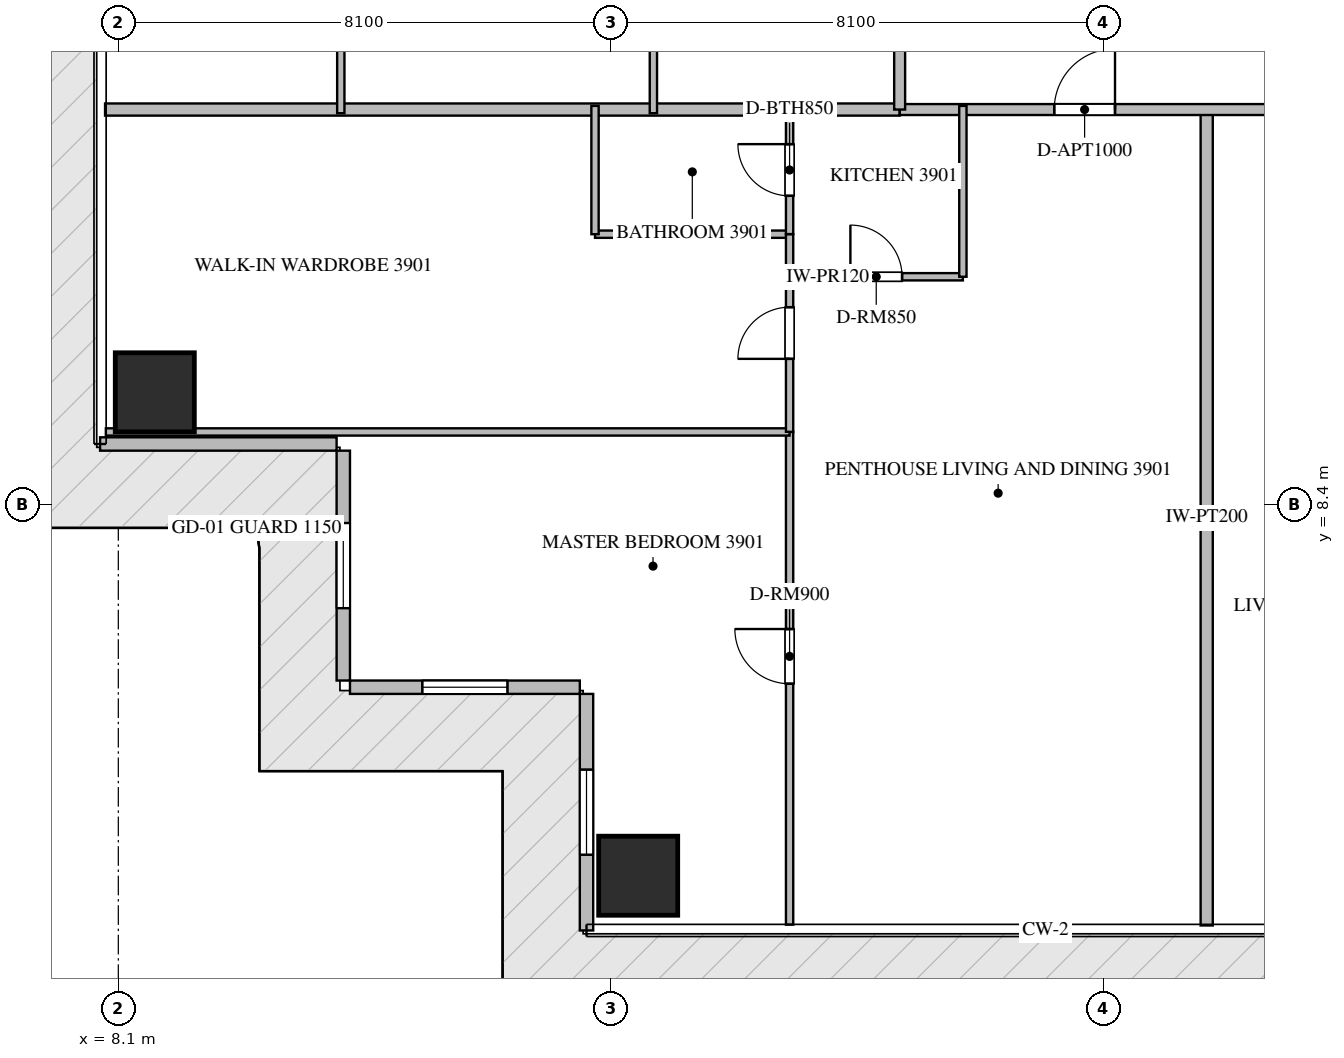
"""IFC4 building model, lengths in metres.
Left out: names, types, materials, properties, quantities, classifications, styles, units other than length and angle.
Written with IfcOpenShell. Run it as: python <this file> out.ifc"""

import sys

from ifc_helpers import new_model, si_unit, direction, frame, frame_2d, origin, origin_2d, place, context, subcontext, project, spatial, rectangle, extrude, source, transform, mapped, element, fill, save


model = new_model("IFC4")
c1 = context("Model", 3, precision=1e-05, world=origin(), true_north=direction((0.0, 1.0)))
c2 = subcontext(c1, "Body", "Model", "MODEL_VIEW")
j1 = project(units=[si_unit("LENGTHUNIT", "METRE"), si_unit("PLANEANGLEUNIT", "RADIAN")], contexts=[c1])
p1 = place(None, origin())
s1 = spatial("IfcSite", under=j1, at=p1, CompositionType="ELEMENT")
p2 = place(p1, origin())
s2 = spatial("IfcBuilding", under=s1, at=p2, CompositionType="ELEMENT")
p3 = place(p2, frame((0.0, 0.0, 157.65)))
s3 = spatial("IfcBuildingStorey", under=s2, at=p3, CompositionType="ELEMENT", Elevation=157.65)
m1 = source(origin(), c2, "Body", "SweptSolid", [
    extrude(rectangle(XDim=1.3, YDim=1.3, at=origin_2d()), origin(), (0.0, 0.0, 1.0), 3.75),
])
for number, where, z_axis, x_axis in (
    (1, (16.65, 2.3, -0.26), (0.0, 0.0, 1.0), (1.0, 0.0, 0.0)),
    (2, (8.7, 10.25, -0.26), (0.0, 0.0, 1.0), (1.0, 0.0, 0.0)),
):
    element("IfcColumn", number, at=place(p3, frame(where, z_axis=z_axis, x_axis=x_axis)), inside=s3, PredefinedType="COLUMN", context=c2, shape_type="MappedRepresentation", body=[
        mapped(m1, transform((0.0, 0.0, 0.0), scale=1.0)),
    ])
p4 = place(p3, frame((7.8, 9.4, 0.0), z_axis=(0.0, 0.0, 1.0), x_axis=(1.0, 0.0, 0.0)))
e3 = element("IfcWall", 3, at=p4, inside=s3, PredefinedType="ELEMENTEDWALL", context=c2, shape_type="SweptSolid", body=[
    extrude(rectangle(XDim=3.89, YDim=0.22, at=frame_2d((1.945, 0.0))), origin(), (0.0, 0.0, 1.0), 3.475),
])
p5 = place(p3, frame((11.8, 9.29, 0.0), z_axis=(0.0, 0.0, 1.0), x_axis=(0.0, -1.0, 0.0)))
e4 = element("IfcWall", 4, at=p5, inside=s3, PredefinedType="ELEMENTEDWALL", context=c2, shape_type="SweptSolid", body=[
    extrude(rectangle(XDim=3.78, YDim=0.22, at=frame_2d((1.89, 0.0))), origin(), (0.0, 0.0, 1.0), 3.475),
])
p6 = place(p5, frame((1.19, 0.0, 0.65)))
e5 = element("IfcOpeningElement", 5, at=p6, cuts=e4, PredefinedType="OPENING", context=c2, shape_type="SweptSolid", body=[
    extrude(rectangle(XDim=1.4, YDim=2.05, at=frame_2d((0.7, 1.025))), frame((0.0, 0.12, 0.0), z_axis=(0.0, -1.0, 0.0), x_axis=(1.0, 0.0, 0.0)), (0.0, 0.0, 1.0), 0.24),
])
p7 = place(p3, frame((11.91, 5.4, 0.0), z_axis=(0.0, 0.0, 1.0), x_axis=(1.0, 0.0, 0.0)))
e6 = element("IfcWall", 6, at=p7, inside=s3, PredefinedType="ELEMENTEDWALL", context=c2, shape_type="SweptSolid", body=[
    extrude(rectangle(XDim=3.78, YDim=0.22, at=frame_2d((1.89, 0.0))), origin(), (0.0, 0.0, 1.0), 3.475),
])
p8 = place(p7, frame((1.19, 0.0, 0.65)))
e7 = element("IfcOpeningElement", 7, at=p8, cuts=e6, PredefinedType="OPENING", context=c2, shape_type="SweptSolid", body=[
    extrude(rectangle(XDim=1.4, YDim=2.05, at=frame_2d((0.7, 1.025))), frame((0.0, 0.12, 0.0), z_axis=(0.0, -1.0, 0.0), x_axis=(1.0, 0.0, 0.0)), (0.0, 0.0, 1.0), 0.24),
])
p9 = place(p3, frame((15.8, 5.29, 0.0), z_axis=(0.0, 0.0, 1.0), x_axis=(0.0, -1.0, 0.0)))
e8 = element("IfcWall", 8, at=p9, inside=s3, PredefinedType="ELEMENTEDWALL", context=c2, shape_type="SweptSolid", body=[
    extrude(rectangle(XDim=3.89, YDim=0.22, at=frame_2d((1.945, 0.0))), origin(), (0.0, 0.0, 1.0), 3.475),
])
p10 = place(p9, frame((1.245, 0.0, 0.65)))
e9 = element("IfcOpeningElement", 9, at=p10, cuts=e8, PredefinedType="OPENING", context=c2, shape_type="SweptSolid", body=[
    extrude(rectangle(XDim=1.4, YDim=2.05, at=frame_2d((0.7, 1.025))), frame((0.0, 0.12, 0.0), z_axis=(0.0, -1.0, 0.0), x_axis=(1.0, 0.0, 0.0)), (0.0, 0.0, 1.0), 0.24),
])
p11 = place(p3, frame((26.0, 1.482, 0.0), z_axis=(0.0, 0.0, 1.0), x_axis=(0.0, 1.0, 0.0)))
e10 = element("IfcWall", 10, at=p11, inside=s3, PredefinedType="PARTITIONING", context=c2, shape_type="SweptSolid", body=[
    extrude(rectangle(XDim=13.418, YDim=0.2, at=frame_2d((6.709, 0.0))), origin(), (0.0, 0.0, 1.0), 3.49),
])
p12 = place(p3, frame((7.882, 14.9, 0.0), z_axis=(0.0, 0.0, 1.0), x_axis=(1.0, 0.0, 0.0)))
e11 = element("IfcWall", 11, at=p12, inside=s3, PredefinedType="PARTITIONING", context=c2, shape_type="SweptSolid", body=[
    extrude(rectangle(XDim=13.068, YDim=0.2, at=frame_2d((6.534, 0.0))), origin(), (0.0, 0.0, 1.0), 3.49),
])
p13 = place(p3, frame((20.952, 14.9, 0.0), z_axis=(0.0, 0.0, 1.0), x_axis=(1.0, 0.0, 0.0)))
e12 = element("IfcWall", 12, at=p13, inside=s3, PredefinedType="PARTITIONING", context=c2, shape_type="SweptSolid", body=[
    extrude(rectangle(XDim=22.896, YDim=0.18, at=frame_2d((11.448, 0.0))), origin(), (0.0, 0.0, 1.0), 3.49),
])
p14 = place(p13, frame((2.54, 0.0, 0.0)))
e13 = element("IfcOpeningElement", 13, at=p14, cuts=e12, PredefinedType="OPENING", context=c2, shape_type="SweptSolid", body=[
    extrude(rectangle(XDim=1.0, YDim=2.15, at=frame_2d((0.5, 1.075))), frame((0.0, 0.1, 0.0), z_axis=(0.0, -1.0, 0.0), x_axis=(1.0, 0.0, 0.0)), (0.0, 0.0, 1.0), 0.2),
])
p15 = place(p13, frame((6.985, 0.0, 0.0)))
e14 = element("IfcOpeningElement", 14, at=p15, cuts=e12, PredefinedType="OPENING", context=c2, shape_type="SweptSolid", body=[
    extrude(rectangle(XDim=1.0, YDim=2.15, at=frame_2d((0.5, 1.075))), frame((0.0, 0.1, 0.0), z_axis=(0.0, -1.0, 0.0), x_axis=(1.0, 0.0, 0.0)), (0.0, 0.0, 1.0), 0.2),
])
p16 = place(p13, frame((19.356, 0.0, 0.0)))
e15 = element("IfcOpeningElement", 15, at=p16, cuts=e12, PredefinedType="OPENING", context=c2, shape_type="SweptSolid", body=[
    extrude(rectangle(XDim=1.0, YDim=2.15, at=frame_2d((0.5, 1.075))), frame((0.0, 0.1, 0.0), z_axis=(0.0, -1.0, 0.0), x_axis=(1.0, 0.0, 0.0)), (0.0, 0.0, 1.0), 0.2),
])
p17 = place(p3, frame((20.95, 14.9, 0.0), z_axis=(0.0, 0.0, 1.0), x_axis=(0.0, 1.0, 0.0)))
e16 = element("IfcWall", 16, at=p17, inside=s3, PredefinedType="PARTITIONING", context=c2, shape_type="SweptSolid", body=[
    extrude(rectangle(XDim=18.7, YDim=0.18, at=frame_2d((9.35, 0.0))), origin(), (0.0, 0.0, 1.0), 3.49),
])
p18 = place(p17, frame((14.603, 0.0, 0.0)))
e17 = element("IfcOpeningElement", 17, at=p18, cuts=e16, PredefinedType="OPENING", context=c2, shape_type="SweptSolid", body=[
    extrude(rectangle(XDim=1.0, YDim=2.15, at=frame_2d((0.5, 1.075))), frame((0.0, 0.1, 0.0), z_axis=(0.0, -1.0, 0.0), x_axis=(1.0, 0.0, 0.0)), (0.0, 0.0, 1.0), 0.2),
])
p19 = place(p3, frame((19.14, 12.15, 0.0), z_axis=(0.0, 0.0, 1.0), x_axis=(1.0, 0.0, 0.0)))
e18 = element("IfcWall", 18, at=p19, inside=s3, PredefinedType="PARTITIONING", context=c2, shape_type="SweptSolid", body=[
    extrude(rectangle(XDim=2.85, YDim=0.12, at=frame_2d((1.425, 0.0))), origin(), (0.0, 0.0, 1.0), 3.49),
])
p20 = place(p19, frame((1.0, 0.0, 0.0)))
e19 = element("IfcOpeningElement", 19, at=p20, cuts=e18, PredefinedType="OPENING", context=c2, shape_type="SweptSolid", body=[
    extrude(rectangle(XDim=0.85, YDim=2.1, at=frame_2d((0.425, 1.05))), frame((0.0, 0.07, 0.0), z_axis=(0.0, -1.0, 0.0), x_axis=(1.0, 0.0, 0.0)), (0.0, 0.0, 1.0), 0.14),
])
p21 = place(p3, frame((21.99, 12.15, 0.0), z_axis=(0.0, 0.0, 1.0), x_axis=(0.0, 1.0, 0.0)))
e20 = element("IfcWall", 20, at=p21, inside=s3, PredefinedType="PARTITIONING", context=c2, shape_type="SweptSolid", body=[
    extrude(rectangle(XDim=2.81, YDim=0.12, at=frame_2d((1.405, 0.0))), origin(), (0.0, 0.0, 1.0), 3.49),
])
p22 = place(p3, frame((19.14, 1.495, 0.0), z_axis=(0.0, 0.0, 1.0), x_axis=(0.0, 1.0, 0.0)))
e21 = element("IfcWall", 21, at=p22, inside=s3, PredefinedType="PARTITIONING", context=c2, shape_type="SweptSolid", body=[
    extrude(rectangle(XDim=8.103, YDim=0.12, at=frame_2d((4.051, 0.0))), origin(), (0.0, 0.0, 1.0), 3.49),
])
p23 = place(p22, frame((3.962, 0.0, 0.0)))
e22 = element("IfcOpeningElement", 22, at=p23, cuts=e21, PredefinedType="OPENING", context=c2, shape_type="SweptSolid", body=[
    extrude(rectangle(XDim=0.9, YDim=2.1, at=frame_2d((0.45, 1.05))), frame((0.0, 0.07, 0.0), z_axis=(0.0, -1.0, 0.0), x_axis=(1.0, 0.0, 0.0)), (0.0, 0.0, 1.0), 0.14),
])
p24 = place(p3, frame((7.895, 9.598, 0.0), z_axis=(0.0, 0.0, 1.0), x_axis=(1.0, 0.0, 0.0)))
e23 = element("IfcWall", 23, at=p24, inside=s3, PredefinedType="PARTITIONING", context=c2, shape_type="SweptSolid", body=[
    extrude(rectangle(XDim=11.245, YDim=0.12, at=frame_2d((5.623, 0.0))), origin(), (0.0, 0.0, 1.0), 3.49),
])
p25 = place(p3, frame((15.94, 12.85, 0.0), z_axis=(0.0, 0.0, 1.0), x_axis=(1.0, 0.0, 0.0)))
e24 = element("IfcWall", 24, at=p25, inside=s3, PredefinedType="PARTITIONING", context=c2, shape_type="SweptSolid", body=[
    extrude(rectangle(XDim=3.2, YDim=0.12, at=frame_2d((1.6, 0.0))), origin(), (0.0, 0.0, 1.0), 3.49),
])
p26 = place(p3, frame((15.94, 12.85, 0.0), z_axis=(0.0, 0.0, 1.0), x_axis=(0.0, 1.0, 0.0)))
e25 = element("IfcWall", 25, at=p26, inside=s3, PredefinedType="PARTITIONING", context=c2, shape_type="SweptSolid", body=[
    extrude(rectangle(XDim=2.11, YDim=0.12, at=frame_2d((1.055, 0.0))), origin(), (0.0, 0.0, 1.0), 3.49),
])
p27 = place(p3, frame((19.14, 9.6, 0.0), z_axis=(0.0, 0.0, 1.0), x_axis=(0.0, 1.0, 0.0)))
e26 = element("IfcWall", 26, at=p27, inside=s3, PredefinedType="PARTITIONING", context=c2, shape_type="SweptSolid", body=[
    extrude(rectangle(XDim=3.25, YDim=0.12, at=frame_2d((1.625, 0.0))), origin(), (0.0, 0.0, 1.0), 3.49),
])
p28 = place(p27, frame((1.2, 0.0, 0.0)))
e27 = element("IfcOpeningElement", 27, at=p28, cuts=e26, PredefinedType="OPENING", context=c2, shape_type="SweptSolid", body=[
    extrude(rectangle(XDim=0.85, YDim=2.1, at=frame_2d((0.425, 1.05))), frame((0.0, 0.07, 0.0), z_axis=(0.0, -1.0, 0.0), x_axis=(1.0, 0.0, 0.0)), (0.0, 0.0, 1.0), 0.14),
])
p29 = place(p3, frame((19.14, 12.852, 0.0), z_axis=(0.0, 0.0, 1.0), x_axis=(0.0, 1.0, 0.0)))
e28 = element("IfcWall", 28, at=p29, inside=s3, PredefinedType="PARTITIONING", context=c2, shape_type="SweptSolid", body=[
    extrude(rectangle(XDim=2.108, YDim=0.12, at=frame_2d((1.054, 0.0))), origin(), (0.0, 0.0, 1.0), 3.49),
])
p30 = place(p29, frame((0.629, 0.0, 0.0)))
e29 = element("IfcOpeningElement", 29, at=p30, cuts=e28, PredefinedType="OPENING", context=c2, shape_type="SweptSolid", body=[
    extrude(rectangle(XDim=0.85, YDim=2.1, at=frame_2d((0.425, 1.05))), frame((0.0, 0.07, 0.0), z_axis=(0.0, -1.0, 0.0), x_axis=(1.0, 0.0, 0.0)), (0.0, 0.0, 1.0), 0.14),
])
p31 = place(p3, frame((11.759, 14.84, 0.0), z_axis=(0.0, 0.0, 1.0), x_axis=(0.0, 1.0, 0.0)))
e30 = element("IfcWall", 30, at=p31, inside=s3, PredefinedType="PARTITIONING", context=c2, shape_type="SweptSolid", body=[
    extrude(rectangle(XDim=11.65, YDim=0.12, at=frame_2d((5.825, 0.0))), origin(), (0.0, 0.0, 1.0), 3.49),
])
p32 = place(p3, frame((16.9, 14.84, 0.0), z_axis=(0.0, 0.0, 1.0), x_axis=(0.0, 1.0, 0.0)))
e31 = element("IfcWall", 31, at=p32, inside=s3, PredefinedType="PARTITIONING", context=c2, shape_type="SweptSolid", body=[
    extrude(rectangle(XDim=11.65, YDim=0.12, at=frame_2d((5.825, 0.0))), origin(), (0.0, 0.0, 1.0), 2.972),
])
m2 = source(origin(), c2, "Body", "SweptSolid", [
    extrude(rectangle(XDim=1.4, YDim=2.05, at=frame_2d((0.7, 1.025))), frame((0.0, 0.03, 0.0), z_axis=(0.0, -1.0, 0.0), x_axis=(1.0, 0.0, 0.0)), (0.0, 0.0, 1.0), 0.06),
])
p33 = place(p6, origin())
e32 = element("IfcWindow", 32, at=p33, inside=s3, PartitioningType="SINGLE_PANEL", PredefinedType="WINDOW", context=c2, shape_type="MappedRepresentation", body=[
    mapped(m2, transform((0.0, 0.0, 0.0), scale=1.0)),
])
fill(e5, e32)
p34 = place(p8, origin())
e33 = element("IfcWindow", 33, at=p34, inside=s3, PartitioningType="SINGLE_PANEL", PredefinedType="WINDOW", context=c2, shape_type="MappedRepresentation", body=[
    mapped(m2, transform((0.0, 0.0, 0.0), scale=1.0)),
])
fill(e7, e33)
p35 = place(p10, origin())
e34 = element("IfcWindow", 34, at=p35, inside=s3, PartitioningType="SINGLE_PANEL", PredefinedType="WINDOW", context=c2, shape_type="MappedRepresentation", body=[
    mapped(m2, transform((0.0, 0.0, 0.0), scale=1.0)),
])
fill(e9, e34)
m3 = source(origin(), c2, "Body", "SweptSolid", [
    extrude(rectangle(XDim=1.0, YDim=2.15, at=frame_2d((0.5, 1.075))), frame((0.0, 0.025, 0.0), z_axis=(0.0, -1.0, 0.0), x_axis=(1.0, 0.0, 0.0)), (0.0, 0.0, 1.0), 0.05),
])
p36 = place(p14, origin())
e35 = element("IfcDoor", 35, at=p36, inside=s3, OperationType="SINGLE_SWING_RIGHT", PredefinedType="DOOR", context=c2, shape_type="MappedRepresentation", body=[
    mapped(m3, transform((0.0, 0.0, 0.0), scale=1.0)),
])
fill(e13, e35)
m4 = source(origin(), c2, "Body", "SweptSolid", [
    extrude(rectangle(XDim=0.85, YDim=2.1, at=frame_2d((0.425, 1.05))), frame((0.0, 0.025, 0.0), z_axis=(0.0, -1.0, 0.0), x_axis=(1.0, 0.0, 0.0)), (0.0, 0.0, 1.0), 0.05),
])
p37 = place(p20, origin())
e36 = element("IfcDoor", 36, at=p37, inside=s3, OperationType="SINGLE_SWING_LEFT", PredefinedType="DOOR", context=c2, shape_type="MappedRepresentation", body=[
    mapped(m4, transform((0.0, 0.0, 0.0), scale=1.0)),
])
fill(e19, e36)
m5 = source(origin(), c2, "Body", "SweptSolid", [
    extrude(rectangle(XDim=0.9, YDim=2.1, at=frame_2d((0.45, 1.05))), frame((0.0, 0.025, 0.0), z_axis=(0.0, -1.0, 0.0), x_axis=(1.0, 0.0, 0.0)), (0.0, 0.0, 1.0), 0.05),
])
p38 = place(p23, origin())
e37 = element("IfcDoor", 37, at=p38, inside=s3, OperationType="SINGLE_SWING_RIGHT", PredefinedType="DOOR", context=c2, shape_type="MappedRepresentation", body=[
    mapped(m5, transform((0.0, 0.0, 0.0), scale=1.0)),
])
fill(e22, e37)
p39 = place(p28, origin())
e38 = element("IfcDoor", 38, at=p39, inside=s3, OperationType="SINGLE_SWING_LEFT", PredefinedType="DOOR", context=c2, shape_type="MappedRepresentation", body=[
    mapped(m4, transform((0.0, 0.0, 0.0), scale=1.0)),
])
fill(e27, e38)
p40 = place(p30, origin())
e39 = element("IfcDoor", 39, at=p40, inside=s3, OperationType="SINGLE_SWING_RIGHT", PredefinedType="DOOR", context=c2, shape_type="MappedRepresentation", body=[
    mapped(m4, transform((0.0, 0.0, 0.0), scale=1.0)),
])
fill(e29, e39)
save(model, sys.argv[1])
